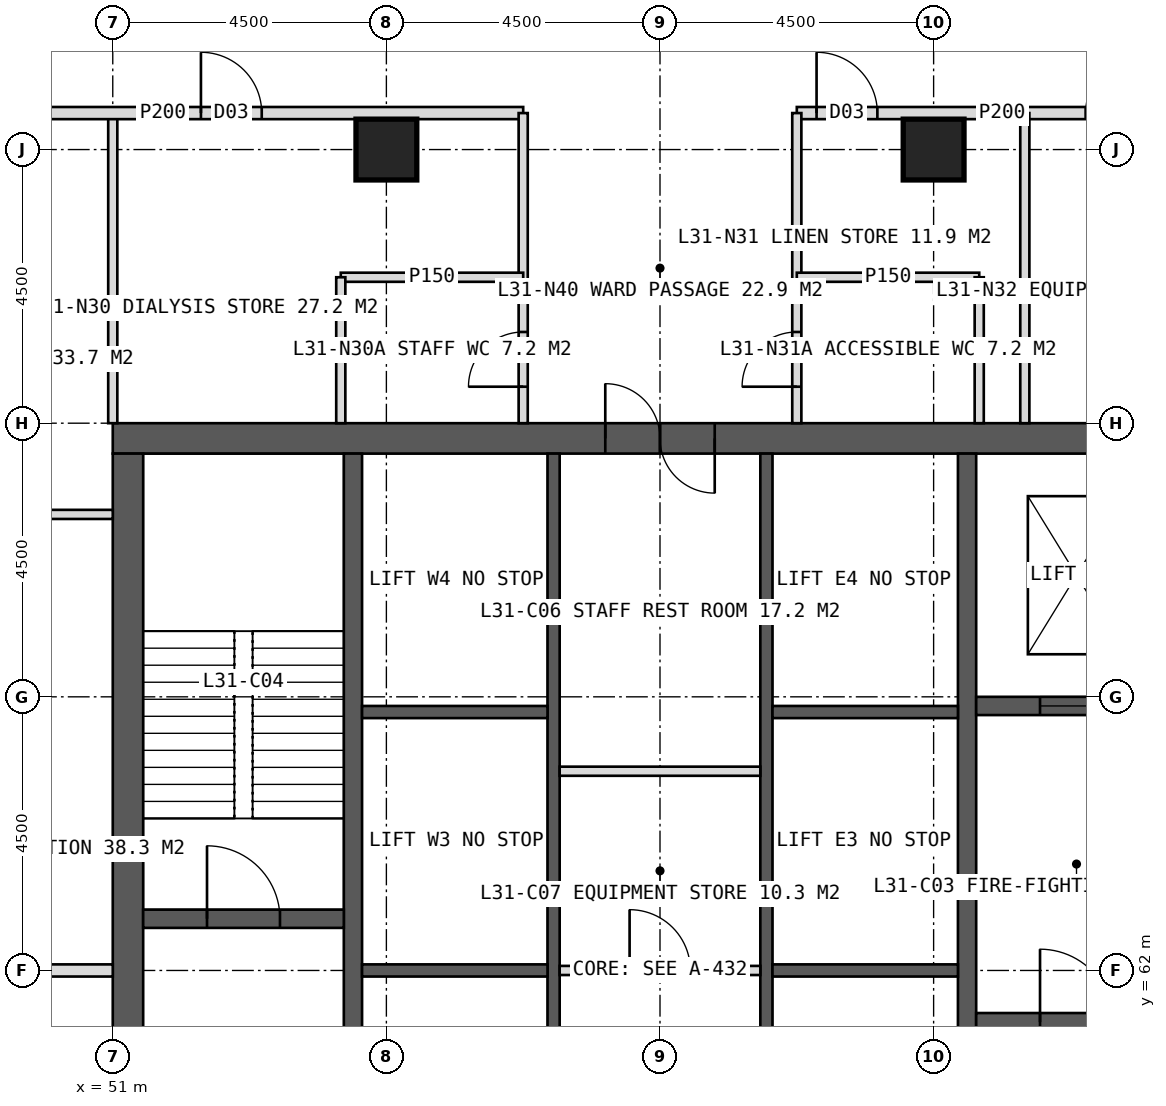
"""IFC4 building model, lengths in metres.
Left out: names, types, materials, properties, quantities, classifications, styles, units other than length and angle.
Written with IfcOpenShell. Run it as: python <this file> out.ifc"""

import sys

from ifc_helpers import new_model, si_unit, direction, frame, frame_2d, origin, origin_2d, place, context, subcontext, project, spatial, rectangle, hollow_rectangle, extrude, element, fill, save


model = new_model("IFC4")
c1 = context("Model", 3, precision=1e-05, world=origin(), true_north=direction((0.0, 1.0)))
c2 = subcontext(c1, "Body", "Model", "MODEL_VIEW")
j1 = project(units=[si_unit("LENGTHUNIT", "METRE"), si_unit("PLANEANGLEUNIT", "RADIAN")], contexts=[c1])
p1 = place(None, origin())
s1 = spatial("IfcSite", under=j1, at=p1, CompositionType="ELEMENT")
p2 = place(p1, origin())
s2 = spatial("IfcBuilding", under=s1, at=p2, CompositionType="ELEMENT")
p3 = place(p2, frame((0.0, 0.0, 132.0)))
s3 = spatial("IfcBuildingStorey", under=s2, at=p3, CompositionType="ELEMENT", Elevation=132.0)
p4 = place(p3, frame((51.0, 70.75, 0.0), z_axis=(0.0, 0.0, 1.0), x_axis=(1.0, 0.0, 0.0)))
e1 = element("IfcWall", 1, at=p4, inside=s3, PredefinedType="SHEAR", context=c2, shape_type="SweptSolid", body=[
    extrude(rectangle(XDim=18.0, YDim=0.5, at=frame_2d((9.0, 0.0))), origin(), (0.0, 0.0, 1.0), 4.0),
])
p5 = place(p4, frame((8.1, 0.0, 0.0)))
e2 = element("IfcOpeningElement", 2, at=p5, cuts=e1, PredefinedType="OPENING", context=c2, shape_type="SweptSolid", body=[
    extrude(rectangle(XDim=1.8, YDim=2.2, at=frame_2d((0.9, 1.1))), frame((0.0, 0.26, 0.0), z_axis=(0.0, -1.0, 0.0), x_axis=(1.0, 0.0, 0.0)), (0.0, 0.0, 1.0), 0.52),
])
p6 = place(p3, frame((51.25, 53.5, 0.0), z_axis=(0.0, 0.0, 1.0), x_axis=(0.0, 1.0, 0.0)))
e3 = element("IfcWall", 3, at=p6, inside=s3, PredefinedType="SHEAR", context=c2, shape_type="SweptSolid", body=[
    extrude(rectangle(XDim=17.0, YDim=0.5, at=frame_2d((8.5, 0.0))), origin(), (0.0, 0.0, 1.0), 4.0),
])
p7 = place(p6, frame((6.0, 0.0, 0.0)))
e4 = element("IfcOpeningElement", 4, at=p7, cuts=e3, PredefinedType="OPENING", context=c2, shape_type="SweptSolid", body=[
    extrude(rectangle(XDim=1.5, YDim=2.2, at=frame_2d((0.75, 1.1))), frame((0.0, 0.26, 0.0), z_axis=(0.0, -1.0, 0.0), x_axis=(1.0, 0.0, 0.0)), (0.0, 0.0, 1.0), 0.52),
])
for number, where, z_axis, x_axis in (
    (5, (54.95, 53.5, 0.0), (0.0, 0.0, 1.0), (0.0, 1.0, 0.0)),
    (6, (65.05, 53.5, 0.0), (0.0, 0.0, 1.0), (0.0, 1.0, 0.0)),
):
    element("IfcWall", number, at=place(p3, frame(where, z_axis=z_axis, x_axis=x_axis)), inside=s3, PredefinedType="SHEAR", context=c2, shape_type="SweptSolid", body=[
        extrude(rectangle(XDim=17.0, YDim=0.3, at=frame_2d((8.5, 0.0))), origin(), (0.0, 0.0, 1.0), 4.0),
    ])
p8 = place(p3, frame((58.25, 53.5, 0.0), z_axis=(0.0, 0.0, 1.0), x_axis=(0.0, 1.0, 0.0)))
e7 = element("IfcWall", 7, at=p8, inside=s3, PredefinedType="SHEAR", context=c2, shape_type="SweptSolid", body=[
    extrude(rectangle(XDim=17.0, YDim=0.2, at=frame_2d((8.5, 0.0))), origin(), (0.0, 0.0, 1.0), 4.0),
])
p9 = place(p8, frame((1.375, 0.0, 0.0)))
e8 = element("IfcOpeningElement", 8, at=p9, cuts=e7, PredefinedType="OPENING", context=c2, shape_type="SweptSolid", body=[
    extrude(rectangle(XDim=1.4, YDim=2.2, at=frame_2d((0.7, 1.1))), frame((0.0, 0.11, 0.0), z_axis=(0.0, -1.0, 0.0), x_axis=(1.0, 0.0, 0.0)), (0.0, 0.0, 1.0), 0.22),
])
p10 = place(p8, frame((5.675, 0.0, 0.0)))
e9 = element("IfcOpeningElement", 9, at=p10, cuts=e7, PredefinedType="OPENING", context=c2, shape_type="SweptSolid", body=[
    extrude(rectangle(XDim=1.4, YDim=2.2, at=frame_2d((0.7, 1.1))), frame((0.0, 0.11, 0.0), z_axis=(0.0, -1.0, 0.0), x_axis=(1.0, 0.0, 0.0)), (0.0, 0.0, 1.0), 0.22),
])
p11 = place(p3, frame((61.75, 53.5, 0.0), z_axis=(0.0, 0.0, 1.0), x_axis=(0.0, 1.0, 0.0)))
e10 = element("IfcWall", 10, at=p11, inside=s3, PredefinedType="SHEAR", context=c2, shape_type="SweptSolid", body=[
    extrude(rectangle(XDim=17.0, YDim=0.2, at=frame_2d((8.5, 0.0))), origin(), (0.0, 0.0, 1.0), 4.0),
])
p12 = place(p11, frame((1.375, 0.0, 0.0)))
e11 = element("IfcOpeningElement", 11, at=p12, cuts=e10, PredefinedType="OPENING", context=c2, shape_type="SweptSolid", body=[
    extrude(rectangle(XDim=1.4, YDim=2.2, at=frame_2d((0.7, 1.1))), frame((0.0, 0.11, 0.0), z_axis=(0.0, -1.0, 0.0), x_axis=(1.0, 0.0, 0.0)), (0.0, 0.0, 1.0), 0.22),
])
p13 = place(p11, frame((5.675, 0.0, 0.0)))
e12 = element("IfcOpeningElement", 12, at=p13, cuts=e10, PredefinedType="OPENING", context=c2, shape_type="SweptSolid", body=[
    extrude(rectangle(XDim=1.4, YDim=2.2, at=frame_2d((0.7, 1.1))), frame((0.0, 0.11, 0.0), z_axis=(0.0, -1.0, 0.0), x_axis=(1.0, 0.0, 0.0)), (0.0, 0.0, 1.0), 0.22),
])
for number, where, z_axis, x_axis in (
    (13, (55.1, 62.0, 0.0), (0.0, 0.0, 1.0), (1.0, 0.0, 0.0)),
    (14, (61.85, 62.0, 0.0), (0.0, 0.0, 1.0), (1.0, 0.0, 0.0)),
    (15, (55.1, 66.25, 0.0), (0.0, 0.0, 1.0), (1.0, 0.0, 0.0)),
    (16, (61.85, 66.25, 0.0), (0.0, 0.0, 1.0), (1.0, 0.0, 0.0)),
):
    element("IfcWall", number, at=place(p3, frame(where, z_axis=z_axis, x_axis=x_axis)), inside=s3, PredefinedType="SHEAR", context=c2, shape_type="SweptSolid", body=[
        extrude(rectangle(XDim=3.05, YDim=0.2, at=frame_2d((1.525, 0.0))), origin(), (0.0, 0.0, 1.0), 4.0),
    ])
p14 = place(p3, frame((51.5, 62.85, 0.0), z_axis=(0.0, 0.0, 1.0), x_axis=(1.0, 0.0, 0.0)))
e17 = element("IfcWall", 17, at=p14, inside=s3, PredefinedType="SHEAR", context=c2, shape_type="SweptSolid", body=[
    extrude(rectangle(XDim=3.3, YDim=0.3, at=frame_2d((1.65, 0.0))), origin(), (0.0, 0.0, 1.0), 4.0),
])
p15 = place(p14, frame((1.05, 0.0, 0.0)))
e18 = element("IfcOpeningElement", 18, at=p15, cuts=e17, PredefinedType="OPENING", context=c2, shape_type="SweptSolid", body=[
    extrude(rectangle(XDim=1.2, YDim=2.1, at=frame_2d((0.6, 1.05))), frame((0.0, 0.16, 0.0), z_axis=(0.0, -1.0, 0.0), x_axis=(1.0, 0.0, 0.0)), (0.0, 0.0, 1.0), 0.32),
])
p16 = place(p3, frame((65.2, 61.15, 0.0), z_axis=(0.0, 0.0, 1.0), x_axis=(1.0, 0.0, 0.0)))
e19 = element("IfcWall", 19, at=p16, inside=s3, PredefinedType="SHEAR", context=c2, shape_type="SweptSolid", body=[
    extrude(rectangle(XDim=3.3, YDim=0.3, at=frame_2d((1.65, 0.0))), origin(), (0.0, 0.0, 1.0), 4.0),
])
p17 = place(p16, frame((1.05, 0.0, 0.0)))
e20 = element("IfcOpeningElement", 20, at=p17, cuts=e19, PredefinedType="OPENING", context=c2, shape_type="SweptSolid", body=[
    extrude(rectangle(XDim=1.2, YDim=2.1, at=frame_2d((0.6, 1.05))), frame((0.0, 0.16, 0.0), z_axis=(0.0, -1.0, 0.0), x_axis=(1.0, 0.0, 0.0)), (0.0, 0.0, 1.0), 0.32),
])
p18 = place(p3, frame((65.2, 66.35, 0.0), z_axis=(0.0, 0.0, 1.0), x_axis=(1.0, 0.0, 0.0)))
e21 = element("IfcWall", 21, at=p18, inside=s3, PredefinedType="SHEAR", context=c2, shape_type="SweptSolid", body=[
    extrude(rectangle(XDim=3.3, YDim=0.3, at=frame_2d((1.65, 0.0))), origin(), (0.0, 0.0, 1.0), 4.0),
])
p19 = place(p18, frame((1.05, 0.0, 0.0)))
e22 = element("IfcOpeningElement", 22, at=p19, cuts=e21, PredefinedType="OPENING", context=c2, shape_type="SweptSolid", body=[
    extrude(rectangle(XDim=1.2, YDim=2.2, at=frame_2d((0.6, 1.1))), frame((0.0, 0.16, 0.0), z_axis=(0.0, -1.0, 0.0), x_axis=(1.0, 0.0, 0.0)), (0.0, 0.0, 1.0), 0.32),
])
for number, where, z_axis, x_axis in (
    (23, (55.5, 75.5, 0.0), (0.0, 0.0, 1.0), (1.0, 0.0, 0.0)),
    (24, (64.5, 75.5, 0.0), (0.0, 0.0, 1.0), (1.0, 0.0, 0.0)),
):
    element("IfcColumn", number, at=place(p3, frame(where, z_axis=z_axis, x_axis=x_axis)), inside=s3, PredefinedType="COLUMN", context=c2, shape_type="SweptSolid", body=[
        extrude(hollow_rectangle(XDim=1.0, YDim=1.0, WallThickness=0.1, at=origin_2d()), origin(), (0.0, 0.0, 1.0), 4.0),
    ])
p20 = place(p3, frame((51.0, 71.0, 0.0), z_axis=(0.0, 0.0, 1.0), x_axis=(0.0, 1.0, 0.0)))
e25 = element("IfcWall", 25, at=p20, inside=s3, PredefinedType="PARTITIONING", context=c2, shape_type="SweptSolid", body=[
    extrude(rectangle(XDim=5.1, YDim=0.15, at=frame_2d((2.55, 0.0))), origin(), (0.0, 0.0, 1.0), 3.75),
])
p21 = place(p3, frame((45.9, 76.1, 0.0), z_axis=(0.0, 0.0, 1.0), x_axis=(1.0, 0.0, 0.0)))
e26 = element("IfcWall", 26, at=p21, inside=s3, PredefinedType="PARTITIONING", context=c2, shape_type="SweptSolid", body=[
    extrude(rectangle(XDim=11.85, YDim=0.2, at=frame_2d((5.925, 0.0))), origin(), (0.0, 0.0, 1.0), 3.75),
])
p22 = place(p21, frame((6.55, 0.0, 0.0)))
e27 = element("IfcOpeningElement", 27, at=p22, cuts=e26, PredefinedType="OPENING", context=c2, shape_type="SweptSolid", body=[
    extrude(rectangle(XDim=1.0, YDim=2.1, at=frame_2d((0.5, 1.05))), frame((0.0, 0.11, 0.0), z_axis=(0.0, -1.0, 0.0), x_axis=(1.0, 0.0, 0.0)), (0.0, 0.0, 1.0), 0.22),
])
p23 = place(p3, frame((62.25, 76.1, 0.0), z_axis=(0.0, 0.0, 1.0), x_axis=(1.0, 0.0, 0.0)))
e28 = element("IfcWall", 28, at=p23, inside=s3, PredefinedType="PARTITIONING", context=c2, shape_type="SweptSolid", body=[
    extrude(rectangle(XDim=6.75, YDim=0.2, at=frame_2d((3.375, 0.0))), origin(), (0.0, 0.0, 1.0), 3.75),
])
p24 = place(p23, frame((0.325, 0.0, 0.0)))
e29 = element("IfcOpeningElement", 29, at=p24, cuts=e28, PredefinedType="OPENING", context=c2, shape_type="SweptSolid", body=[
    extrude(rectangle(XDim=1.0, YDim=2.1, at=frame_2d((0.5, 1.05))), frame((0.0, 0.11, 0.0), z_axis=(0.0, -1.0, 0.0), x_axis=(1.0, 0.0, 0.0)), (0.0, 0.0, 1.0), 0.22),
])
p25 = place(p23, frame((4.75, 0.0, 0.0)))
e30 = element("IfcOpeningElement", 30, at=p25, cuts=e28, PredefinedType="OPENING", context=c2, shape_type="SweptSolid", body=[
    extrude(rectangle(XDim=1.0, YDim=2.1, at=frame_2d((0.5, 1.05))), frame((0.0, 0.11, 0.0), z_axis=(0.0, -1.0, 0.0), x_axis=(1.0, 0.0, 0.0)), (0.0, 0.0, 1.0), 0.22),
])
p26 = place(p3, frame((57.75, 71.0, 0.0), z_axis=(0.0, 0.0, 1.0), x_axis=(0.0, 1.0, 0.0)))
e31 = element("IfcWall", 31, at=p26, inside=s3, PredefinedType="PARTITIONING", context=c2, shape_type="SweptSolid", body=[
    extrude(rectangle(XDim=5.1, YDim=0.15, at=frame_2d((2.55, 0.0))), origin(), (0.0, 0.0, 1.0), 3.75),
])
p27 = place(p26, frame((0.6, 0.0, 0.0)))
e32 = element("IfcOpeningElement", 32, at=p27, cuts=e31, PredefinedType="OPENING", context=c2, shape_type="SweptSolid", body=[
    extrude(rectangle(XDim=0.9, YDim=2.1, at=frame_2d((0.45, 1.05))), frame((0.0, 0.085, 0.0), z_axis=(0.0, -1.0, 0.0), x_axis=(1.0, 0.0, 0.0)), (0.0, 0.0, 1.0), 0.17),
])
p28 = place(p3, frame((62.25, 71.0, 0.0), z_axis=(0.0, 0.0, 1.0), x_axis=(0.0, 1.0, 0.0)))
e33 = element("IfcWall", 33, at=p28, inside=s3, PredefinedType="PARTITIONING", context=c2, shape_type="SweptSolid", body=[
    extrude(rectangle(XDim=5.1, YDim=0.15, at=frame_2d((2.55, 0.0))), origin(), (0.0, 0.0, 1.0), 3.75),
])
p29 = place(p28, frame((0.6, 0.0, 0.0)))
e34 = element("IfcOpeningElement", 34, at=p29, cuts=e33, PredefinedType="OPENING", context=c2, shape_type="SweptSolid", body=[
    extrude(rectangle(XDim=0.9, YDim=2.1, at=frame_2d((0.45, 1.05))), frame((0.0, 0.085, 0.0), z_axis=(0.0, -1.0, 0.0), x_axis=(1.0, 0.0, 0.0)), (0.0, 0.0, 1.0), 0.17),
])
p30 = place(p3, frame((66.0, 71.0, 0.0), z_axis=(0.0, 0.0, 1.0), x_axis=(0.0, 1.0, 0.0)))
e35 = element("IfcWall", 35, at=p30, inside=s3, PredefinedType="PARTITIONING", context=c2, shape_type="SweptSolid", body=[
    extrude(rectangle(XDim=5.1, YDim=0.15, at=frame_2d((2.55, 0.0))), origin(), (0.0, 0.0, 1.0), 3.75),
])
p31 = place(p3, frame((54.75, 73.4, 0.0), z_axis=(0.0, 0.0, 1.0), x_axis=(1.0, 0.0, 0.0)))
e36 = element("IfcWall", 36, at=p31, inside=s3, PredefinedType="PARTITIONING", context=c2, shape_type="SweptSolid", body=[
    extrude(rectangle(XDim=3.0, YDim=0.15, at=frame_2d((1.5, 0.0))), origin(), (0.0, 0.0, 1.0), 3.75),
])
p32 = place(p3, frame((54.75, 71.0, 0.0), z_axis=(0.0, 0.0, 1.0), x_axis=(0.0, 1.0, 0.0)))
e37 = element("IfcWall", 37, at=p32, inside=s3, PredefinedType="PARTITIONING", context=c2, shape_type="SweptSolid", body=[
    extrude(rectangle(XDim=2.4, YDim=0.15, at=frame_2d((1.2, 0.0))), origin(), (0.0, 0.0, 1.0), 3.75),
])
p33 = place(p3, frame((62.25, 73.4, 0.0), z_axis=(0.0, 0.0, 1.0), x_axis=(1.0, 0.0, 0.0)))
e38 = element("IfcWall", 38, at=p33, inside=s3, PredefinedType="PARTITIONING", context=c2, shape_type="SweptSolid", body=[
    extrude(rectangle(XDim=3.0, YDim=0.15, at=frame_2d((1.5, 0.0))), origin(), (0.0, 0.0, 1.0), 3.75),
])
p34 = place(p3, frame((65.25, 71.0, 0.0), z_axis=(0.0, 0.0, 1.0), x_axis=(0.0, 1.0, 0.0)))
e39 = element("IfcWall", 39, at=p34, inside=s3, PredefinedType="PARTITIONING", context=c2, shape_type="SweptSolid", body=[
    extrude(rectangle(XDim=2.4, YDim=0.15, at=frame_2d((1.2, 0.0))), origin(), (0.0, 0.0, 1.0), 3.75),
])
p35 = place(p3, frame((51.0, 62.0, 0.0), z_axis=(0.0, 0.0, 1.0), x_axis=(-1.0, 0.0, 0.0)))
e40 = element("IfcWall", 40, at=p35, inside=s3, PredefinedType="SOLIDWALL", context=c2, shape_type="SweptSolid", body=[
    extrude(rectangle(XDim=5.1, YDim=0.2, at=frame_2d((2.55, 0.0))), origin(), (0.0, 0.0, 1.0), 2.95),
])
p36 = place(p3, frame((51.0, 69.5, 0.0), z_axis=(0.0, 0.0, 1.0), x_axis=(-1.0, 0.0, 0.0)))
e41 = element("IfcWall", 41, at=p36, inside=s3, PredefinedType="PARTITIONING", context=c2, shape_type="SweptSolid", body=[
    extrude(rectangle(XDim=5.1, YDim=0.15, at=frame_2d((2.55, 0.0))), origin(), (0.0, 0.0, 1.0), 3.75),
])
p37 = place(p3, frame((58.35, 62.0, 0.0), z_axis=(0.0, 0.0, 1.0), x_axis=(1.0, 0.0, 0.0)))
e42 = element("IfcWall", 42, at=p37, inside=s3, PredefinedType="PARTITIONING", context=c2, shape_type="SweptSolid", body=[
    extrude(rectangle(XDim=3.3, YDim=0.15, at=frame_2d((1.65, 0.0))), origin(), (0.0, 0.0, 1.0), 3.75),
])
p38 = place(p37, frame((1.15, 0.0, 0.0)))
e43 = element("IfcOpeningElement", 43, at=p38, cuts=e42, PredefinedType="OPENING", context=c2, shape_type="SweptSolid", body=[
    extrude(rectangle(XDim=1.0, YDim=2.1, at=frame_2d((0.5, 1.05))), frame((0.0, 0.085, 0.0), z_axis=(0.0, -1.0, 0.0), x_axis=(1.0, 0.0, 0.0)), (0.0, 0.0, 1.0), 0.17),
])
p39 = place(p3, frame((58.35, 65.277, 0.0), z_axis=(0.0, 0.0, 1.0), x_axis=(1.0, 0.0, 0.0)))
e44 = element("IfcWall", 44, at=p39, inside=s3, PredefinedType="PARTITIONING", context=c2, shape_type="SweptSolid", body=[
    extrude(rectangle(XDim=3.3, YDim=0.15, at=frame_2d((1.65, 0.0))), origin(), (0.0, 0.0, 1.0), 3.75),
])
p40 = place(p27, origin())
e45 = element("IfcDoor", 45, at=p40, inside=s3, OperationType="SINGLE_SWING_LEFT", PredefinedType="DOOR", context=c2, shape_type="SweptSolid", body=[
    extrude(rectangle(XDim=0.9, YDim=2.1, at=frame_2d((0.45, 1.05))), frame((0.0, 0.025, 0.0), z_axis=(0.0, -1.0, 0.0), x_axis=(1.0, 0.0, 0.0)), (0.0, 0.0, 1.0), 0.05),
])
fill(e32, e45)
p41 = place(p22, origin())
e46 = element("IfcDoor", 46, at=p41, inside=s3, OperationType="SINGLE_SWING_LEFT", PredefinedType="DOOR", context=c2, shape_type="SweptSolid", body=[
    extrude(rectangle(XDim=1.0, YDim=2.1, at=frame_2d((0.5, 1.05))), frame((0.0, 0.025, 0.0), z_axis=(0.0, -1.0, 0.0), x_axis=(1.0, 0.0, 0.0)), (0.0, 0.0, 1.0), 0.05),
])
fill(e27, e46)
p42 = place(p29, origin())
e47 = element("IfcDoor", 47, at=p42, inside=s3, OperationType="SINGLE_SWING_LEFT", PredefinedType="DOOR", context=c2, shape_type="SweptSolid", body=[
    extrude(rectangle(XDim=0.9, YDim=2.1, at=frame_2d((0.45, 1.05))), frame((0.0, 0.025, 0.0), z_axis=(0.0, -1.0, 0.0), x_axis=(1.0, 0.0, 0.0)), (0.0, 0.0, 1.0), 0.05),
])
fill(e34, e47)
p43 = place(p24, origin())
e48 = element("IfcDoor", 48, at=p43, inside=s3, OperationType="SINGLE_SWING_LEFT", PredefinedType="DOOR", context=c2, shape_type="SweptSolid", body=[
    extrude(rectangle(XDim=1.0, YDim=2.1, at=frame_2d((0.5, 1.05))), frame((0.0, 0.025, 0.0), z_axis=(0.0, -1.0, 0.0), x_axis=(1.0, 0.0, 0.0)), (0.0, 0.0, 1.0), 0.05),
])
fill(e29, e48)
p44 = place(p15, origin())
e49 = element("IfcDoor", 49, at=p44, inside=s3, OperationType="SINGLE_SWING_LEFT", PredefinedType="DOOR", context=c2, shape_type="SweptSolid", body=[
    extrude(rectangle(XDim=1.2, YDim=2.1, at=frame_2d((0.6, 1.05))), frame((0.0, 0.025, 0.0), z_axis=(0.0, -1.0, 0.0), x_axis=(1.0, 0.0, 0.0)), (0.0, 0.0, 1.0), 0.05),
])
fill(e18, e49)
p45 = place(p17, origin())
e50 = element("IfcDoor", 50, at=p45, inside=s3, OperationType="SINGLE_SWING_LEFT", PredefinedType="DOOR", context=c2, shape_type="SweptSolid", body=[
    extrude(rectangle(XDim=1.2, YDim=2.1, at=frame_2d((0.6, 1.05))), frame((0.0, 0.025, 0.0), z_axis=(0.0, -1.0, 0.0), x_axis=(1.0, 0.0, 0.0)), (0.0, 0.0, 1.0), 0.05),
])
fill(e20, e50)
p46 = place(p19, origin())
e51 = element("IfcDoor", 51, at=p46, inside=s3, OperationType="SLIDING_TO_LEFT", PredefinedType="DOOR", context=c2, shape_type="SweptSolid", body=[
    extrude(rectangle(XDim=1.2, YDim=2.2, at=frame_2d((0.6, 1.1))), frame((0.0, 0.025, 0.0), z_axis=(0.0, -1.0, 0.0), x_axis=(1.0, 0.0, 0.0)), (0.0, 0.0, 1.0), 0.05),
])
fill(e22, e51)
p47 = place(p38, origin())
e52 = element("IfcDoor", 52, at=p47, inside=s3, OperationType="SINGLE_SWING_LEFT", PredefinedType="DOOR", context=c2, shape_type="SweptSolid", body=[
    extrude(rectangle(XDim=1.0, YDim=2.1, at=frame_2d((0.5, 1.05))), frame((0.0, 0.025, 0.0), z_axis=(0.0, -1.0, 0.0), x_axis=(1.0, 0.0, 0.0)), (0.0, 0.0, 1.0), 0.05),
])
fill(e43, e52)
p48 = place(p5, origin())
e53 = element("IfcDoor", 53, at=p48, inside=s3, OperationType="DOUBLE_DOOR_SINGLE_SWING", PredefinedType="DOOR", context=c2, shape_type="SweptSolid", body=[
    extrude(rectangle(XDim=1.8, YDim=2.2, at=frame_2d((0.9, 1.1))), frame((0.0, 0.025, 0.0), z_axis=(0.0, -1.0, 0.0), x_axis=(1.0, 0.0, 0.0)), (0.0, 0.0, 1.0), 0.05),
])
fill(e2, e53)
save(model, sys.argv[1])
